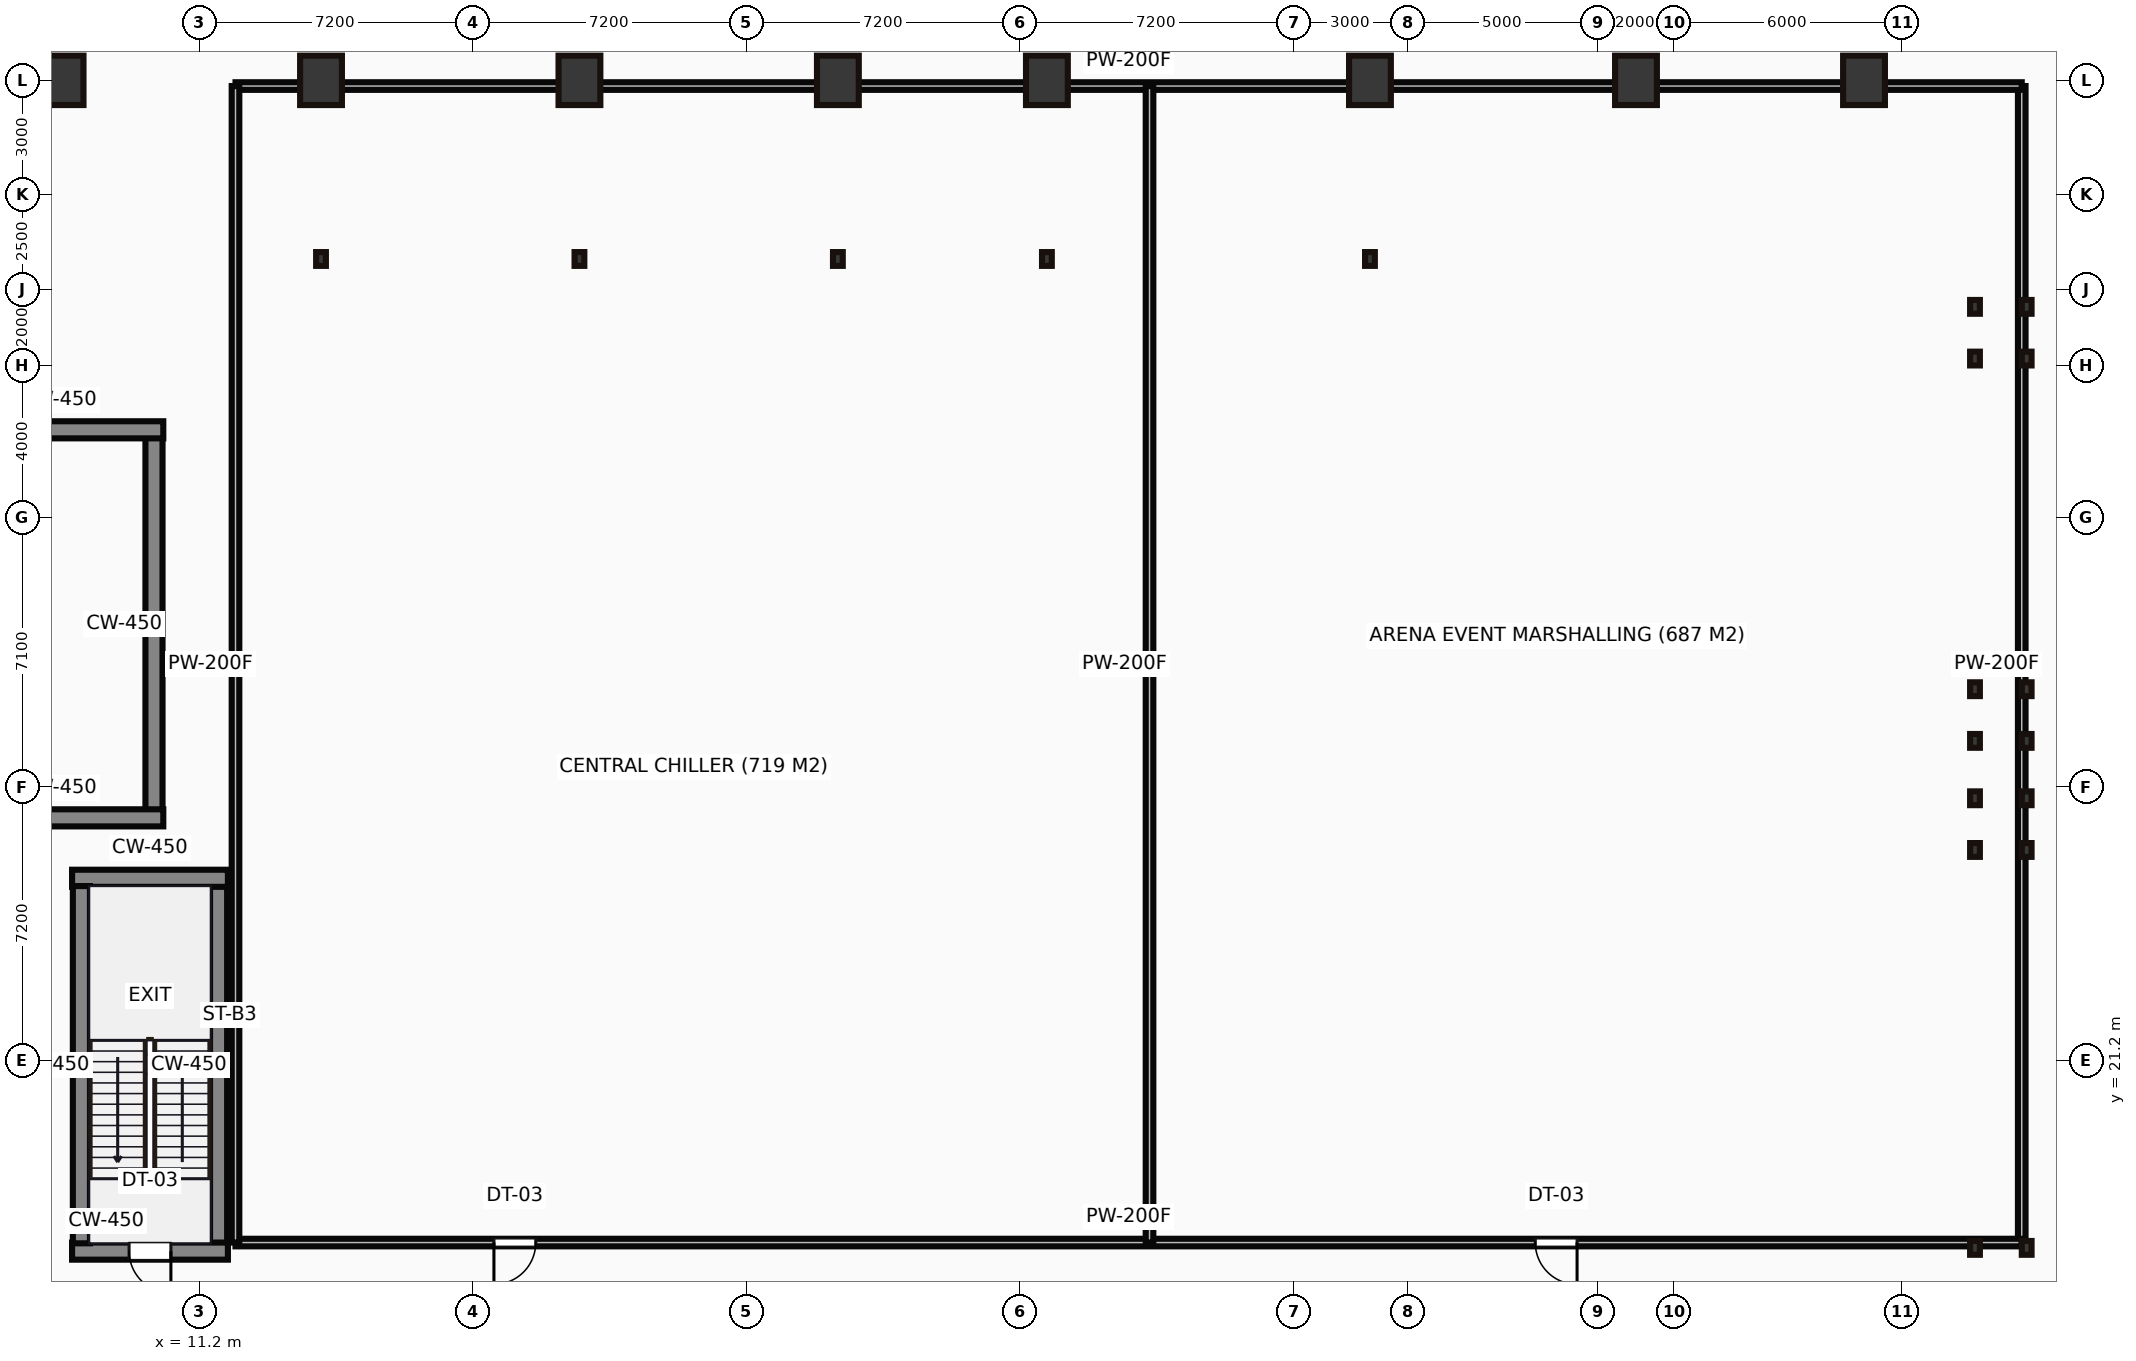
"""IFC4 building model, lengths in metres.
Left out: names, types, materials, properties, quantities, classifications, styles, units other than length and angle.
Written with IfcOpenShell. Run it as: python <this file> out.ifc"""

import sys

from ifc_helpers import new_model, si_unit, direction, frame, frame_2d, origin, origin_2d, place, context, subcontext, project, spatial, rectangle, hollow_rectangle, i_section, extrude, source, transform, mapped, element, fill, save


model = new_model("IFC4")
c1 = context("Model", 3, precision=1e-05, world=origin(), true_north=direction((0.0, 1.0)))
c2 = subcontext(c1, "Body", "Model", "MODEL_VIEW")
j1 = project(units=[si_unit("LENGTHUNIT", "METRE"), si_unit("PLANEANGLEUNIT", "RADIAN")], contexts=[c1])
p1 = place(None, origin())
s1 = spatial("IfcSite", under=j1, at=p1, CompositionType="ELEMENT")
p2 = place(p1, origin())
s2 = spatial("IfcBuilding", under=s1, at=p2, CompositionType="ELEMENT")
p3 = place(p2, frame((0.0, 0.0, -5.0)))
s3 = spatial("IfcBuildingStorey", under=s2, at=p3, CompositionType="ELEMENT", Elevation=-5.0)
m1 = source(origin(), c2, "Body", "SweptSolid", [
    extrude(hollow_rectangle(XDim=1.1, YDim=1.3, WallThickness=0.055, at=origin_2d()), origin(), (0.0, 0.0, 1.0), 5.0),
])
for number, where, z_axis, x_axis in (
    (1, (7.6, 47.0, 0.0), (0.0, 0.0, 1.0), (1.0, 0.0, 0.0)),
    (2, (14.4, 47.0, 0.0), (0.0, 0.0, 1.0), (1.0, 0.0, 0.0)),
    (3, (21.2, 47.0, 0.0), (0.0, 0.0, 1.0), (1.0, 0.0, 0.0)),
    (4, (28.0, 47.0, 0.0), (0.0, 0.0, 1.0), (1.0, 0.0, 0.0)),
    (5, (33.5, 47.0, 0.0), (0.0, 0.0, 1.0), (1.0, 0.0, 0.0)),
    (6, (42.0, 47.0, 0.0), (0.0, 0.0, 1.0), (1.0, 0.0, 0.0)),
    (7, (49.0, 47.0, 0.0), (0.0, 0.0, 1.0), (1.0, 0.0, 0.0)),
    (8, (55.0, 47.0, 0.0), (0.0, 0.0, 1.0), (1.0, 0.0, 0.0)),
):
    element("IfcColumn", number, at=place(p3, frame(where, z_axis=z_axis, x_axis=x_axis)), inside=s3, PredefinedType="PILASTER", context=c2, shape_type="MappedRepresentation", body=[
        mapped(m1, transform((0.0, 0.0, 0.0))),
    ])
m2 = source(origin(), c2, "Body", "SweptSolid", [
    extrude(i_section(OverallWidth=0.257, OverallDepth=0.363, WebThickness=0.013, FlangeThickness=0.022, at=origin_2d()), origin(), (0.0, 0.0, 1.0), 5.0),
])
for number, where, z_axis, x_axis in (
    (9, (14.4, 42.3, 0.0), (0.0, 0.0, 1.0), (1.0, 0.0, 0.0)),
    (10, (21.2, 42.3, 0.0), (0.0, 0.0, 1.0), (1.0, 0.0, 0.0)),
    (11, (28.0, 42.3, 0.0), (0.0, 0.0, 1.0), (1.0, 0.0, 0.0)),
    (12, (33.5, 42.3, 0.0), (0.0, 0.0, 1.0), (1.0, 0.0, 0.0)),
    (13, (42.0, 42.3, 0.0), (0.0, 0.0, 1.0), (1.0, 0.0, 0.0)),
):
    element("IfcColumn", number, at=place(p3, frame(where, z_axis=z_axis, x_axis=x_axis)), inside=s3, PredefinedType="COLUMN", context=c2, shape_type="MappedRepresentation", body=[
        mapped(m2, transform((0.0, 0.0, 0.0))),
    ])
m3 = source(origin(), c2, "Body", "SweptSolid", [
    extrude(rectangle(XDim=5.5, YDim=0.45, at=frame_2d((2.75, 0.0))), origin(), (0.0, 0.0, 1.0), 5.0),
])
p4 = place(p3, frame((4.75, 27.595, 0.0), z_axis=(0.0, 0.0, 1.0), x_axis=(1.0, 0.0, 0.0)))
e14 = element("IfcWall", 14, at=p4, inside=s3, PredefinedType="SHEAR", context=c2, shape_type="MappedRepresentation", body=[
    mapped(m3, transform((0.0, 0.0, 0.0))),
])
m4 = source(origin(), c2, "Body", "SweptSolid", [
    extrude(rectangle(XDim=9.8, YDim=0.45, at=frame_2d((4.9, 0.0))), origin(), (0.0, 0.0, 1.0), 5.0),
])
p5 = place(p3, frame((10.005, 27.8, 0.0), z_axis=(0.0, 0.0, 1.0), x_axis=(0.0, 1.0, 0.0)))
e15 = element("IfcWall", 15, at=p5, inside=s3, PredefinedType="SHEAR", context=c2, shape_type="MappedRepresentation", body=[
    mapped(m4, transform((0.0, 0.0, 0.0))),
])
p6 = place(p3, frame((4.75, 37.805, 0.0), z_axis=(0.0, 0.0, 1.0), x_axis=(1.0, 0.0, 0.0)))
e16 = element("IfcWall", 16, at=p6, inside=s3, PredefinedType="SHEAR", context=c2, shape_type="MappedRepresentation", body=[
    mapped(m3, transform((0.0, 0.0, 0.0))),
])
m5 = source(origin(), c2, "Body", "SweptSolid", [
    extrude(rectangle(XDim=4.1, YDim=0.45, at=frame_2d((2.05, 0.0))), origin(), (0.0, 0.0, 1.0), 5.0),
])
p7 = place(p3, frame((7.85, 16.195, 0.0), z_axis=(0.0, 0.0, 1.0), x_axis=(1.0, 0.0, 0.0)))
e17 = element("IfcWall", 17, at=p7, inside=s3, PredefinedType="SHEAR", context=c2, shape_type="MappedRepresentation", body=[
    mapped(m5, transform((0.0, 0.0, 0.0))),
])
p8 = place(p7, frame((1.5, 0.0, 0.0)))
e18 = element("IfcOpeningElement", 18, at=p8, cuts=e17, PredefinedType="OPENING", context=c2, shape_type="SweptSolid", body=[
    extrude(rectangle(XDim=1.1, YDim=2.15, at=frame_2d((0.55, 1.075))), frame((0.0, 0.235, 0.0), z_axis=(0.0, -1.0, 0.0), x_axis=(1.0, 0.0, 0.0)), (0.0, 0.0, 1.0), 0.47),
])
m6 = source(origin(), c2, "Body", "SweptSolid", [
    extrude(rectangle(XDim=9.4, YDim=0.45, at=frame_2d((4.7, 0.0))), origin(), (0.0, 0.0, 1.0), 5.0),
])
for number, where, z_axis, x_axis in (
    (19, (8.095, 16.4, 0.0), (0.0, 0.0, 1.0), (0.0, 1.0, 0.0)),
    (20, (11.705, 16.4, 0.0), (0.0, 0.0, 1.0), (0.0, 1.0, 0.0)),
):
    element("IfcWall", number, at=place(p3, frame(where, z_axis=z_axis, x_axis=x_axis)), inside=s3, PredefinedType="SHEAR", context=c2, shape_type="MappedRepresentation", body=[
        mapped(m6, transform((0.0, 0.0, 0.0))),
    ])
p9 = place(p3, frame((7.85, 26.005, 0.0), z_axis=(0.0, 0.0, 1.0), x_axis=(1.0, 0.0, 0.0)))
e21 = element("IfcWall", 21, at=p9, inside=s3, PredefinedType="SHEAR", context=c2, shape_type="MappedRepresentation", body=[
    mapped(m5, transform((0.0, 0.0, 0.0))),
])
m7 = source(origin(), c2, "Body", "SweptSolid", [
    extrude(i_section(OverallWidth=0.257, OverallDepth=0.363, WebThickness=0.013, FlangeThickness=0.022, at=origin_2d()), origin(), (0.0, 0.0, 1.0), 4.8),
])
for number, where, z_axis, x_axis in (
    (22, (57.92, 16.28, 0.0), (0.0, 0.0, 1.0), (1.0, 0.0, 0.0)),
    (23, (59.28, 16.28, 0.0), (0.0, 0.0, 1.0), (1.0, 0.0, 0.0)),
):
    element("IfcColumn", number, at=place(p3, frame(where, z_axis=z_axis, x_axis=x_axis)), inside=s3, PredefinedType="COLUMN", context=c2, shape_type="MappedRepresentation", body=[
        mapped(m7, transform((0.0, 0.0, 0.0))),
    ])
for number, where, z_axis, x_axis in (
    (24, (57.92, 26.75, 0.0), (0.0, 0.0, 1.0), (1.0, 0.0, 0.0)),
    (25, (57.92, 28.11, 0.0), (0.0, 0.0, 1.0), (1.0, 0.0, 0.0)),
    (26, (59.28, 26.75, 0.0), (0.0, 0.0, 1.0), (1.0, 0.0, 0.0)),
    (27, (59.28, 28.11, 0.0), (0.0, 0.0, 1.0), (1.0, 0.0, 0.0)),
    (28, (57.92, 29.62, 0.0), (0.0, 0.0, 1.0), (1.0, 0.0, 0.0)),
    (29, (57.92, 30.98, 0.0), (0.0, 0.0, 1.0), (1.0, 0.0, 0.0)),
    (30, (59.28, 29.62, 0.0), (0.0, 0.0, 1.0), (1.0, 0.0, 0.0)),
    (31, (59.28, 30.98, 0.0), (0.0, 0.0, 1.0), (1.0, 0.0, 0.0)),
    (32, (57.92, 39.68, 0.0), (0.0, 0.0, 1.0), (1.0, 0.0, 0.0)),
    (33, (57.92, 41.04, 0.0), (0.0, 0.0, 1.0), (1.0, 0.0, 0.0)),
    (34, (59.28, 39.68, 0.0), (0.0, 0.0, 1.0), (1.0, 0.0, 0.0)),
    (35, (59.28, 41.04, 0.0), (0.0, 0.0, 1.0), (1.0, 0.0, 0.0)),
):
    element("IfcColumn", number, at=place(p3, frame(where, z_axis=z_axis, x_axis=x_axis)), inside=s3, PredefinedType="COLUMN", context=c2, shape_type="MappedRepresentation", body=[
        mapped(m2, transform((0.0, 0.0, 0.0))),
    ])
m8 = source(origin(), c2, "Body", "SweptSolid", [
    extrude(rectangle(XDim=47.0, YDim=0.2, at=frame_2d((23.5, 0.0))), origin(), (0.0, 0.0, 1.0), 4.7),
])
p10 = place(p3, frame((12.15, 16.42, 0.0), z_axis=(0.0, 0.0, 1.0), x_axis=(1.0, 0.0, 0.0)))
e36 = element("IfcWall", 36, at=p10, inside=s3, PredefinedType="PARTITIONING", context=c2, shape_type="MappedRepresentation", body=[
    mapped(m8, transform((0.0, 0.0, 0.0))),
])
p11 = place(p10, frame((6.8, 0.0, 0.0)))
e37 = element("IfcOpeningElement", 37, at=p11, cuts=e36, PredefinedType="OPENING", context=c2, shape_type="SweptSolid", body=[
    extrude(rectangle(XDim=1.1, YDim=2.15, at=frame_2d((0.55, 1.075))), frame((0.0, 0.11, 0.0), z_axis=(0.0, -1.0, 0.0), x_axis=(1.0, 0.0, 0.0)), (0.0, 0.0, 1.0), 0.22),
])
p12 = place(p10, frame((34.2, 0.0, 0.0)))
e38 = element("IfcOpeningElement", 38, at=p12, cuts=e36, PredefinedType="OPENING", context=c2, shape_type="SweptSolid", body=[
    extrude(rectangle(XDim=1.1, YDim=2.15, at=frame_2d((0.55, 1.075))), frame((0.0, 0.11, 0.0), z_axis=(0.0, -1.0, 0.0), x_axis=(1.0, 0.0, 0.0)), (0.0, 0.0, 1.0), 0.22),
])
m9 = source(origin(), c2, "Body", "SweptSolid", [
    extrude(rectangle(XDim=30.43, YDim=0.2, at=frame_2d((15.215, 0.0))), origin(), (0.0, 0.0, 1.0), 4.7),
])
p13 = place(p3, frame((12.15, 16.42, 0.0), z_axis=(0.0, 0.0, 1.0), x_axis=(0.0, 1.0, 0.0)))
e39 = element("IfcWall", 39, at=p13, inside=s3, PredefinedType="PARTITIONING", context=c2, shape_type="MappedRepresentation", body=[
    mapped(m9, transform((0.0, 0.0, 0.0))),
])
m10 = source(origin(), c2, "Body", "SweptSolid", [
    extrude(rectangle(XDim=47.0, YDim=0.2, at=frame_2d((23.5, 0.0))), origin(), (0.0, 0.0, 1.0), 3.844),
])
p14 = place(p3, frame((12.15, 46.85, 0.0), z_axis=(0.0, 0.0, 1.0), x_axis=(1.0, 0.0, 0.0)))
e40 = element("IfcWall", 40, at=p14, inside=s3, PredefinedType="PARTITIONING", context=c2, shape_type="MappedRepresentation", body=[
    mapped(m10, transform((0.0, 0.0, 0.0))),
])
for number, where, z_axis, x_axis in (
    (41, (59.15, 16.42, 0.0), (0.0, 0.0, 1.0), (0.0, 1.0, 0.0)),
    (42, (36.2, 16.42, 0.0), (0.0, 0.0, 1.0), (0.0, 1.0, 0.0)),
):
    element("IfcWall", number, at=place(p3, frame(where, z_axis=z_axis, x_axis=x_axis)), inside=s3, PredefinedType="PARTITIONING", context=c2, shape_type="MappedRepresentation", body=[
        mapped(m9, transform((0.0, 0.0, 0.0))),
    ])
m11 = source(origin(), c2, "Body", "SweptSolid", [
    extrude(rectangle(XDim=1.1, YDim=2.15, at=frame_2d((0.55, 1.075))), frame((0.0, 0.025, 0.0), z_axis=(0.0, -1.0, 0.0), x_axis=(1.0, 0.0, 0.0)), (0.0, 0.0, 1.0), 0.05),
])
p15 = place(p11, origin())
e43 = element("IfcDoor", 43, at=p15, inside=s3, OperationType="SINGLE_SWING_LEFT", PredefinedType="DOOR", context=c2, shape_type="MappedRepresentation", body=[
    mapped(m11, transform((0.0, 0.0, 0.0))),
])
fill(e37, e43)
p16 = place(p12, origin())
e44 = element("IfcDoor", 44, at=p16, inside=s3, OperationType="SINGLE_SWING_RIGHT", PredefinedType="DOOR", context=c2, shape_type="MappedRepresentation", body=[
    mapped(m11, transform((0.0, 0.0, 0.0))),
])
fill(e38, e44)
p17 = place(p8, origin())
e45 = element("IfcDoor", 45, at=p17, inside=s3, OperationType="SINGLE_SWING_RIGHT", PredefinedType="DOOR", context=c2, shape_type="MappedRepresentation", body=[
    mapped(m11, transform((0.0, 0.0, 0.0))),
])
fill(e18, e45)
save(model, sys.argv[1])
